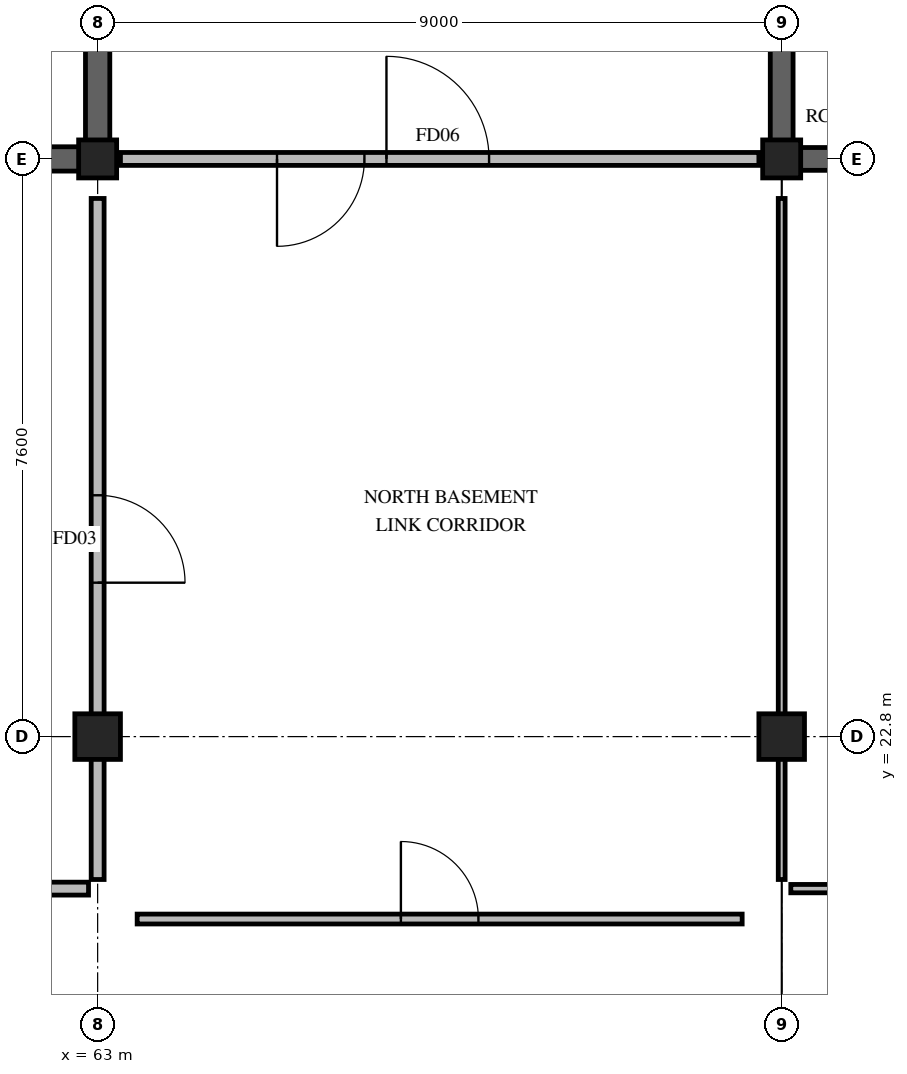
"""IFC4 building model, lengths in metres.
Left out: names, types, materials, properties, quantities, classifications, styles, units other than length and angle.
Written with IfcOpenShell. Run it as: python <this file> out.ifc"""

import sys

from ifc_helpers import new_model, si_unit, direction, frame, frame_2d, origin, origin_2d, place, context, subcontext, project, spatial, rectangle, extrude, element, fill, save


model = new_model("IFC4")
c1 = context("Model", 3, precision=1e-05, world=origin(), true_north=direction((0.0, 1.0)))
c2 = subcontext(c1, "Body", "Model", "MODEL_VIEW")
j1 = project(units=[si_unit("LENGTHUNIT", "METRE"), si_unit("PLANEANGLEUNIT", "RADIAN")], contexts=[c1])
p1 = place(None, origin())
s1 = spatial("IfcSite", under=j1, at=p1, CompositionType="ELEMENT")
p2 = place(p1, origin())
s2 = spatial("IfcBuilding", under=s1, at=p2, CompositionType="ELEMENT")
p3 = place(p2, frame((0.0, 0.0, -4.32)))
s3 = spatial("IfcBuildingStorey", under=s2, at=p3, CompositionType="ELEMENT", Elevation=-4.32)
p4 = place(p3, frame((63.0, 22.8, 0.0), z_axis=(0.0, 0.0, 1.0), x_axis=(1.0, 0.0, 0.0)))
e1 = element("IfcColumn", 1, at=p4, inside=s3, PredefinedType="COLUMN", context=c2, shape_type="SweptSolid", body=[
    extrude(rectangle(XDim=0.6, YDim=0.6, at=origin_2d()), origin(), (0.0, 0.0, 1.0), 4.32),
])
p5 = place(p3, frame((63.0, 30.4, 0.0), z_axis=(0.0, 0.0, 1.0), x_axis=(1.0, 0.0, 0.0)))
e2 = element("IfcColumn", 2, at=p5, inside=s3, PredefinedType="COLUMN", context=c2, shape_type="SweptSolid", body=[
    extrude(rectangle(XDim=0.5, YDim=0.5, at=origin_2d()), origin(), (0.0, 0.0, 1.0), 4.32),
])
p6 = place(p3, frame((72.0, 22.8, 0.0), z_axis=(0.0, 0.0, 1.0), x_axis=(1.0, 0.0, 0.0)))
e3 = element("IfcColumn", 3, at=p6, inside=s3, PredefinedType="COLUMN", context=c2, shape_type="SweptSolid", body=[
    extrude(rectangle(XDim=0.6, YDim=0.6, at=origin_2d()), origin(), (0.0, 0.0, 1.0), 4.32),
])
p7 = place(p3, frame((72.0, 30.4, 0.0), z_axis=(0.0, 0.0, 1.0), x_axis=(1.0, 0.0, 0.0)))
e4 = element("IfcColumn", 4, at=p7, inside=s3, PredefinedType="COLUMN", context=c2, shape_type="SweptSolid", body=[
    extrude(rectangle(XDim=0.5, YDim=0.5, at=origin_2d()), origin(), (0.0, 0.0, 1.0), 4.32),
])
p8 = place(p3, frame((81.0, 30.4, 0.0), z_axis=(0.0, 0.0, 1.0), x_axis=(-1.0, 0.0, 0.0)))
e5 = element("IfcWall", 5, at=p8, inside=s3, PredefinedType="SOLIDWALL", context=c2, shape_type="SweptSolid", body=[
    extrude(rectangle(XDim=9.0, YDim=0.3, at=frame_2d((4.5, 0.0))), origin(), (0.0, 0.0, 1.0), 4.04),
])
p9 = place(p3, frame((72.0, 30.4, 0.0), z_axis=(0.0, 0.0, 1.0), x_axis=(0.0, 1.0, 0.0)))
e6 = element("IfcWall", 6, at=p9, inside=s3, PredefinedType="SOLIDWALL", context=c2, shape_type="SweptSolid", body=[
    extrude(rectangle(XDim=7.6, YDim=0.3, at=frame_2d((3.8, 0.0))), origin(), (0.0, 0.0, 1.0), 4.04),
])
p10 = place(p3, frame((54.16, 30.4, 0.0), z_axis=(0.0, 0.0, 1.0), x_axis=(1.0, 0.0, 0.0)))
e7 = element("IfcWall", 7, at=p10, inside=s3, PredefinedType="SHEAR", context=c2, shape_type="SweptSolid", body=[
    extrude(rectangle(XDim=8.68, YDim=0.32, at=frame_2d((4.34, 0.0))), origin(), (0.0, 0.0, 1.0), 4.04),
])
p11 = place(p3, frame((63.0, 30.56, 0.0), z_axis=(0.0, 0.0, 1.0), x_axis=(0.0, 1.0, 0.0)))
e8 = element("IfcWall", 8, at=p11, inside=s3, PredefinedType="SHEAR", context=c2, shape_type="SweptSolid", body=[
    extrude(rectangle(XDim=7.28, YDim=0.32, at=frame_2d((3.64, 0.0))), origin(), (0.0, 0.0, 1.0), 4.04),
])
p12 = place(p11, frame((4.6, 0.0, 0.0)))
e9 = element("IfcOpeningElement", 9, at=p12, cuts=e8, PredefinedType="OPENING", context=c2, shape_type="SweptSolid", body=[
    extrude(rectangle(XDim=1.0, YDim=2.15, at=frame_2d((0.5, 1.075))), frame((0.0, 0.17, 0.0), z_axis=(0.0, -1.0, 0.0), x_axis=(1.0, 0.0, 0.0)), (0.0, 0.0, 1.0), 0.34),
])
p13 = place(p3, frame((63.3, 30.4, 0.0), z_axis=(0.0, 0.0, 1.0), x_axis=(1.0, 0.0, 0.0)))
e10 = element("IfcWall", 10, at=p13, inside=s3, PredefinedType="PARTITIONING", context=c2, shape_type="SweptSolid", body=[
    extrude(rectangle(XDim=8.4, YDim=0.17, at=frame_2d((4.2, 0.0))), origin(), (0.0, 0.0, 1.0), 3.571),
])
p14 = place(p13, frame((3.5, 0.0, 0.0)))
e11 = element("IfcOpeningElement", 11, at=p14, cuts=e10, PredefinedType="OPENING", context=c2, shape_type="SweptSolid", body=[
    extrude(rectangle(XDim=1.35, YDim=2.18, at=frame_2d((0.675, 1.09))), frame((0.0, 0.095, 0.0), z_axis=(0.0, -1.0, 0.0), x_axis=(1.0, 0.0, 0.0)), (0.0, 0.0, 1.0), 0.19),
])
p15 = place(p13, frame((2.06, 0.0, 0.0)))
e12 = element("IfcOpeningElement", 12, at=p15, cuts=e10, PredefinedType="OPENING", context=c2, shape_type="SweptSolid", body=[
    extrude(rectangle(XDim=1.15, YDim=2.15, at=frame_2d((0.575, 1.075))), frame((0.0, 0.095, 0.0), z_axis=(0.0, -1.0, 0.0), x_axis=(1.0, 0.0, 0.0)), (0.0, 0.0, 1.0), 0.19),
])
p16 = place(p3, frame((63.0, 20.92, 0.0), z_axis=(0.0, 0.0, 1.0), x_axis=(0.0, 1.0, 0.0)))
e13 = element("IfcWall", 13, at=p16, inside=s3, PredefinedType="PARTITIONING", context=c2, shape_type="SweptSolid", body=[
    extrude(rectangle(XDim=8.96, YDim=0.17, at=frame_2d((4.48, 0.0))), origin(), (0.0, 0.0, 1.0), 3.559),
])
p17 = place(p16, frame((3.905, 0.0, 0.0)))
e14 = element("IfcOpeningElement", 14, at=p17, cuts=e13, PredefinedType="OPENING", context=c2, shape_type="SweptSolid", body=[
    extrude(rectangle(XDim=1.15, YDim=2.15, at=frame_2d((0.575, 1.075))), frame((0.0, 0.095, 0.0), z_axis=(0.0, -1.0, 0.0), x_axis=(1.0, 0.0, 0.0)), (0.0, 0.0, 1.0), 0.19),
])
p18 = place(p3, frame((54.52, 20.8, 0.0), z_axis=(0.0, 0.0, 1.0), x_axis=(1.0, 0.0, 0.0)))
e15 = element("IfcWall", 15, at=p18, inside=s3, PredefinedType="PARTITIONING", context=c2, shape_type="SweptSolid", body=[
    extrude(rectangle(XDim=8.36, YDim=0.17, at=frame_2d((4.18, 0.0))), origin(), (0.0, 0.0, 1.0), 4.04),
])
p19 = place(p18, frame((3.605, 0.0, 0.0)))
e16 = element("IfcOpeningElement", 16, at=p19, cuts=e15, PredefinedType="OPENING", context=c2, shape_type="SweptSolid", body=[
    extrude(rectangle(XDim=1.15, YDim=2.15, at=frame_2d((0.575, 1.075))), frame((0.0, 0.095, 0.0), z_axis=(0.0, -1.0, 0.0), x_axis=(1.0, 0.0, 0.0)), (0.0, 0.0, 1.0), 0.19),
])
p20 = place(p3, frame((72.12, 20.8, 0.0), z_axis=(0.0, 0.0, 1.0), x_axis=(1.0, 0.0, 0.0)))
e17 = element("IfcWall", 17, at=p20, inside=s3, PredefinedType="PARTITIONING", context=c2, shape_type="SweptSolid", body=[
    extrude(rectangle(XDim=17.36, YDim=0.11, at=frame_2d((8.68, 0.0))), origin(), (0.0, 0.0, 1.0), 4.04),
])
p21 = place(p20, frame((8.13, 0.0, 0.0)))
e18 = element("IfcOpeningElement", 18, at=p21, cuts=e17, PredefinedType="OPENING", context=c2, shape_type="SweptSolid", body=[
    extrude(rectangle(XDim=1.1, YDim=2.06, at=frame_2d((0.55, 1.03))), frame((0.0, 0.065, 0.0), z_axis=(0.0, -1.0, 0.0), x_axis=(1.0, 0.0, 0.0)), (0.0, 0.0, 1.0), 0.13),
])
p22 = place(p3, frame((72.0, 20.92, 0.0), z_axis=(0.0, 0.0, 1.0), x_axis=(0.0, 1.0, 0.0)))
e19 = element("IfcWall", 19, at=p22, inside=s3, PredefinedType="PARTITIONING", context=c2, shape_type="SweptSolid", body=[
    extrude(rectangle(XDim=8.96, YDim=0.09, at=frame_2d((4.48, 0.0))), origin(), (0.0, 0.0, 1.0), 3.559),
])
p23 = place(p3, frame((63.52, 20.4, 0.0), z_axis=(0.0, 0.0, 1.0), x_axis=(1.0, 0.0, 0.0)))
e20 = element("IfcWall", 20, at=p23, inside=s3, PredefinedType="PARTITIONING", context=c2, shape_type="SweptSolid", body=[
    extrude(rectangle(XDim=7.96, YDim=0.13, at=frame_2d((3.98, 0.0))), origin(), (0.0, 0.0, 1.0), 3.711),
])
p24 = place(p23, frame((3.47, 0.0, 0.0)))
e21 = element("IfcOpeningElement", 21, at=p24, cuts=e20, PredefinedType="OPENING", context=c2, shape_type="SweptSolid", body=[
    extrude(rectangle(XDim=1.02, YDim=2.1, at=frame_2d((0.51, 1.05))), frame((0.0, 0.075, 0.0), z_axis=(0.0, -1.0, 0.0), x_axis=(1.0, 0.0, 0.0)), (0.0, 0.0, 1.0), 0.15),
])
p25 = place(p14, origin())
e22 = element("IfcDoor", 22, at=p25, inside=s3, OperationType="SINGLE_SWING_LEFT", PredefinedType="DOOR", context=c2, shape_type="SweptSolid", body=[
    extrude(rectangle(XDim=1.35, YDim=2.18, at=frame_2d((0.675, 1.09))), frame((0.0, 0.025, 0.0), z_axis=(0.0, -1.0, 0.0), x_axis=(1.0, 0.0, 0.0)), (0.0, 0.0, 1.0), 0.05),
])
fill(e11, e22)
p26 = place(p17, origin())
e23 = element("IfcDoor", 23, at=p26, inside=s3, OperationType="SINGLE_SWING_RIGHT", PredefinedType="DOOR", context=c2, shape_type="SweptSolid", body=[
    extrude(rectangle(XDim=1.15, YDim=2.15, at=frame_2d((0.575, 1.075))), frame((0.0, 0.025, 0.0), z_axis=(0.0, -1.0, 0.0), x_axis=(1.0, 0.0, 0.0)), (0.0, 0.0, 1.0), 0.05),
])
fill(e14, e23)
p27 = place(p24, origin())
e24 = element("IfcDoor", 24, at=p27, inside=s3, OperationType="SINGLE_SWING_LEFT", PredefinedType="DOOR", context=c2, shape_type="SweptSolid", body=[
    extrude(rectangle(XDim=1.02, YDim=2.1, at=frame_2d((0.51, 1.05))), frame((0.0, 0.025, 0.0), z_axis=(0.0, -1.0, 0.0), x_axis=(1.0, 0.0, 0.0)), (0.0, 0.0, 1.0), 0.05),
])
fill(e21, e24)
p28 = place(p15, origin())
e25 = element("IfcDoor", 25, at=p28, inside=s3, OperationType="SINGLE_SWING_RIGHT", PredefinedType="DOOR", context=c2, shape_type="SweptSolid", body=[
    extrude(rectangle(XDim=1.15, YDim=2.15, at=frame_2d((0.575, 1.075))), frame((0.0, 0.025, 0.0), z_axis=(0.0, -1.0, 0.0), x_axis=(1.0, 0.0, 0.0)), (0.0, 0.0, 1.0), 0.05),
])
fill(e12, e25)
save(model, sys.argv[1])
